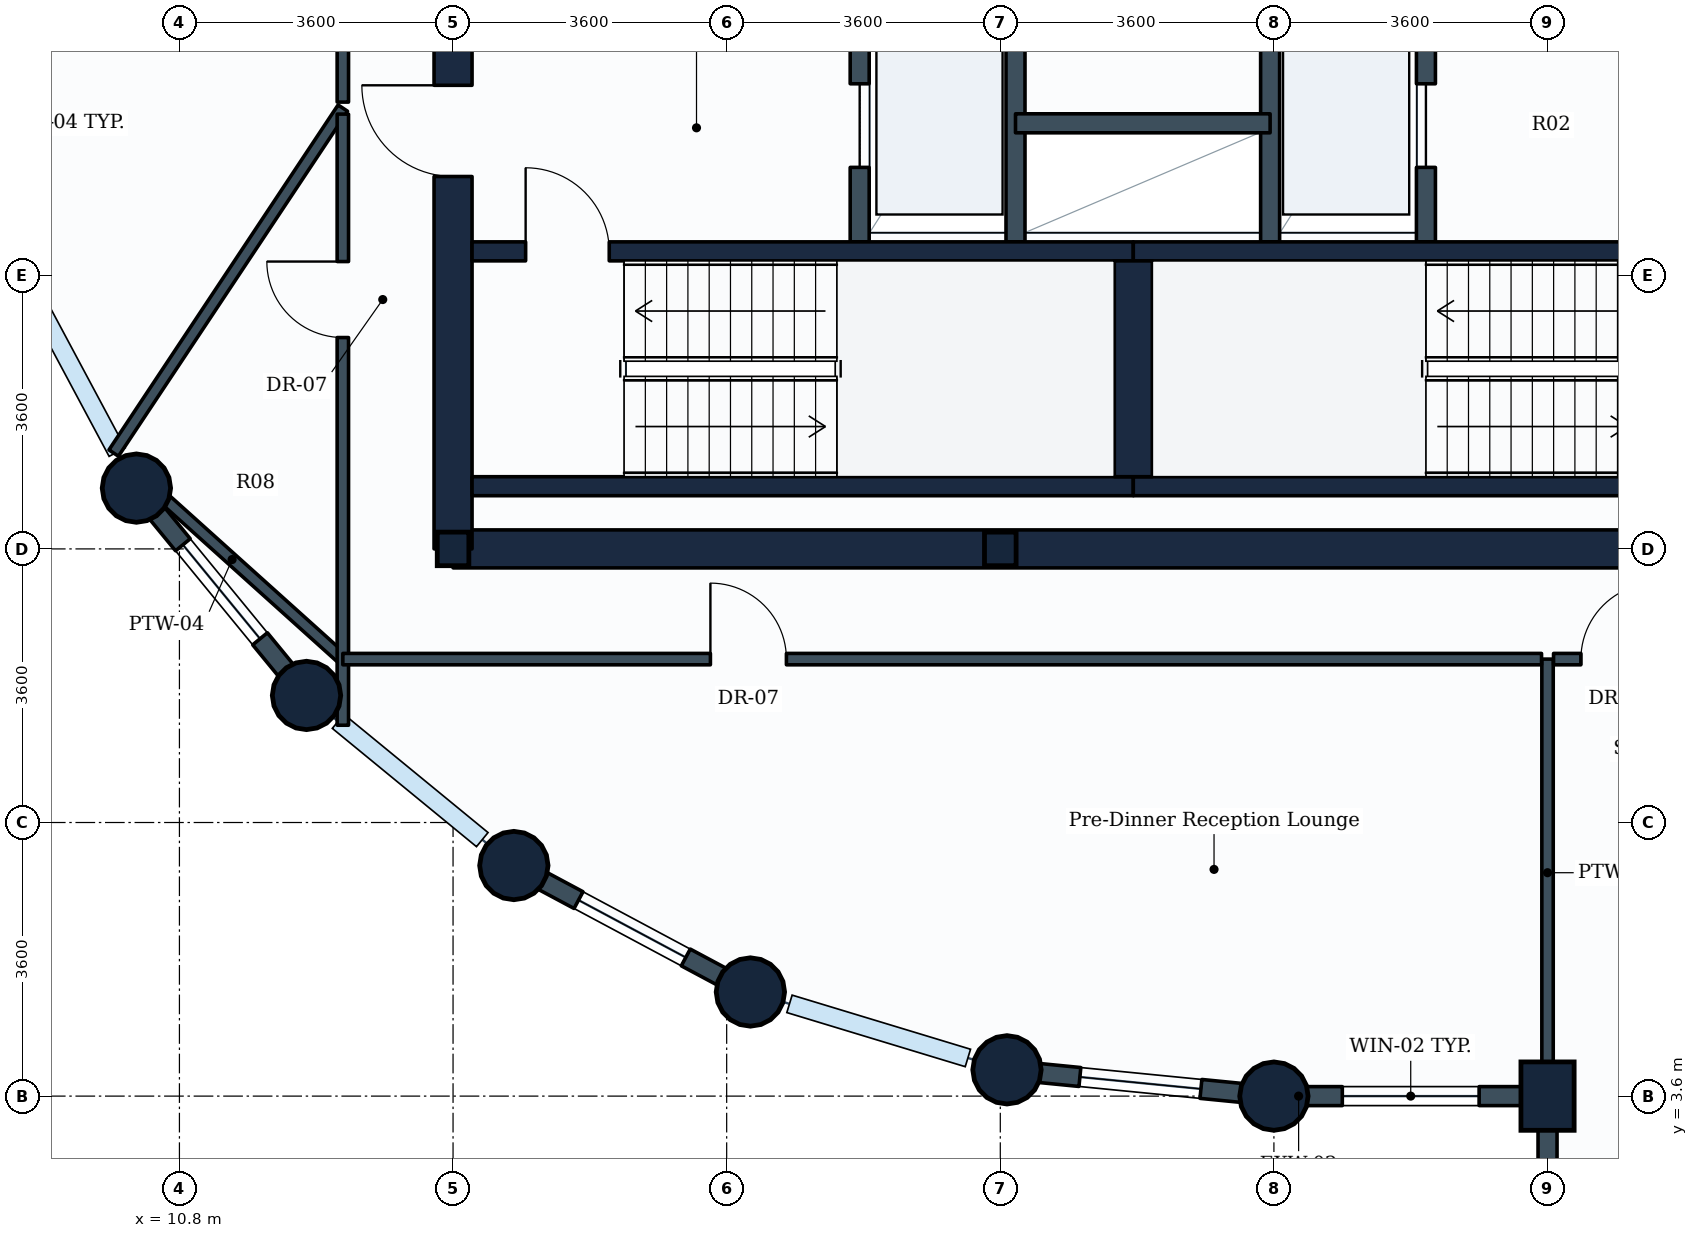
"""IFC4 building model, lengths in metres.
Left out: names, types, materials, properties, quantities, classifications, styles, units other than length and angle.
Written with IfcOpenShell. Run it as: python <this file> out.ifc"""

import sys

from ifc_helpers import new_model, si_unit, direction, frame, frame_2d, origin, origin_2d, place, context, subcontext, project, spatial, rectangle, circle, i_section, extrude, element, fill, save


model = new_model("IFC4")
c1 = context("Model", 3, precision=1e-05, world=origin(), true_north=direction((0.0, 1.0)))
c2 = subcontext(c1, "Body", "Model", "MODEL_VIEW")
j1 = project(units=[si_unit("LENGTHUNIT", "METRE"), si_unit("PLANEANGLEUNIT", "RADIAN")], contexts=[c1])
p1 = place(None, origin())
s1 = spatial("IfcSite", under=j1, at=p1, CompositionType="ELEMENT")
p2 = place(p1, origin())
s2 = spatial("IfcBuilding", under=s1, at=p2, CompositionType="ELEMENT")
p3 = place(p2, frame((0.0, 0.0, 205.2)))
s3 = spatial("IfcBuildingStorey", under=s2, at=p3, CompositionType="ELEMENT", Elevation=205.2)
for number, where, z_axis, x_axis in (
    (1, (10.234, 11.6, 0.0), (0.0, 0.0, 1.0), (1.0, 0.0, 0.0)),
    (2, (12.472, 8.872, 0.0), (0.0, 0.0, 1.0), (1.0, 0.0, 0.0)),
):
    element("IfcColumn", number, at=place(p3, frame(where, z_axis=z_axis, x_axis=x_axis)), inside=s3, PredefinedType="COLUMN", context=c2, shape_type="SweptSolid", body=[
        extrude(circle(Radius=0.45, at=origin_2d()), origin(), (0.0, 0.0, 1.0), 3.8),
    ])
p4 = place(p3, frame((14.4, 10.8, 0.0), z_axis=(0.0, 0.0, 1.0), x_axis=(1.0, 0.0, 0.0)))
e3 = element("IfcColumn", 3, at=p4, inside=s3, PredefinedType="COLUMN", context=c2, shape_type="SweptSolid", body=[
    extrude(i_section(OverallWidth=0.416, OverallDepth=0.442, WebThickness=0.025, FlangeThickness=0.041, FilletRadius=0.015, at=origin_2d()), origin(), (0.0, 0.0, 1.0), 3.8),
])
for number, where, z_axis, x_axis in (
    (4, (15.2, 6.634, 0.0), (0.0, 0.0, 1.0), (1.0, 0.0, 0.0)),
    (5, (18.312, 4.97, 0.0), (0.0, 0.0, 1.0), (1.0, 0.0, 0.0)),
):
    element("IfcColumn", number, at=place(p3, frame(where, z_axis=z_axis, x_axis=x_axis)), inside=s3, PredefinedType="COLUMN", context=c2, shape_type="SweptSolid", body=[
        extrude(circle(Radius=0.45, at=origin_2d()), origin(), (0.0, 0.0, 1.0), 3.8),
    ])
p5 = place(p3, frame((21.6, 10.8, 0.0), z_axis=(0.0, 0.0, 1.0), x_axis=(1.0, 0.0, 0.0)))
e6 = element("IfcColumn", 6, at=p5, inside=s3, PredefinedType="COLUMN", context=c2, shape_type="SweptSolid", body=[
    extrude(i_section(OverallWidth=0.416, OverallDepth=0.442, WebThickness=0.025, FlangeThickness=0.041, FilletRadius=0.015, at=origin_2d()), origin(), (0.0, 0.0, 1.0), 3.8),
])
for number, where, z_axis, x_axis in (
    (7, (21.688, 3.946, 0.0), (0.0, 0.0, 1.0), (1.0, 0.0, 0.0)),
    (8, (25.2, 3.6, 0.0), (0.0, 0.0, 1.0), (1.0, 0.0, 0.0)),
):
    element("IfcColumn", number, at=place(p3, frame(where, z_axis=z_axis, x_axis=x_axis)), inside=s3, PredefinedType="COLUMN", context=c2, shape_type="SweptSolid", body=[
        extrude(circle(Radius=0.45, at=origin_2d()), origin(), (0.0, 0.0, 1.0), 3.8),
    ])
p6 = place(p3, frame((28.8, 3.6, 0.0), z_axis=(0.0, 0.0, 1.0), x_axis=(1.0, 0.0, 0.0)))
e9 = element("IfcColumn", 9, at=p6, inside=s3, PredefinedType="COLUMN", context=c2, shape_type="SweptSolid", body=[
    extrude(rectangle(XDim=0.7, YDim=0.9, at=origin_2d()), origin(), (0.0, 0.0, 1.0), 3.8),
])
p7 = place(p3, frame((28.8, 3.6, 0.0), z_axis=(0.0, 0.0, 1.0), x_axis=(-1.0, 0.0, 0.0)))
e10 = element("IfcWall", 10, at=p7, inside=s3, PredefinedType="STANDARD", context=c2, shape_type="SweptSolid", body=[
    extrude(rectangle(XDim=3.6, YDim=0.25, at=frame_2d((1.8, 0.0))), origin(), (0.0, 0.0, 1.0), 2.93),
])
p8 = place(p7, frame((0.9, 0.0, 0.85)))
e11 = element("IfcOpeningElement", 11, at=p8, cuts=e10, PredefinedType="OPENING", context=c2, shape_type="SweptSolid", body=[
    extrude(rectangle(XDim=1.8, YDim=1.35, at=frame_2d((0.9, 0.675))), frame((0.0, 0.135, 0.0), z_axis=(0.0, -1.0, 0.0), x_axis=(1.0, 0.0, 0.0)), (0.0, 0.0, 1.0), 0.27),
])
p9 = place(p3, frame((28.8, 3.6, 0.0), z_axis=(0.0, 0.0, 1.0), x_axis=(0.0, -1.0, 0.0)))
e12 = element("IfcWall", 12, at=p9, inside=s3, PredefinedType="STANDARD", context=c2, shape_type="SweptSolid", body=[
    extrude(rectangle(XDim=2.1, YDim=0.25, at=frame_2d((1.05, 0.0))), origin(), (0.0, 0.0, 1.0), 2.93),
])
p10 = place(p3, frame((12.472, 8.872, 0.0), z_axis=(0.0, 0.0, 1.0), x_axis=(-0.634258295121, 0.773121216285, 0.0)))
e13 = element("IfcWall", 13, at=p10, inside=s3, PredefinedType="STANDARD", context=c2, shape_type="SweptSolid", body=[
    extrude(rectangle(XDim=3.529, YDim=0.25, at=frame_2d((1.764, 0.0))), origin(), (0.0, 0.0, 1.0), 2.93),
])
p11 = place(p10, frame((0.964, 0.0, 0.85)))
e14 = element("IfcOpeningElement", 14, at=p11, cuts=e13, PredefinedType="OPENING", context=c2, shape_type="SweptSolid", body=[
    extrude(rectangle(XDim=1.6, YDim=1.35, at=frame_2d((0.8, 0.675))), frame((0.0, 0.135, 0.0), z_axis=(0.0, -1.0, 0.0), x_axis=(1.0, 0.0, 0.0)), (0.0, 0.0, 1.0), 0.27),
])
p12 = place(p3, frame((18.312, 4.97, 0.0), z_axis=(0.0, 0.0, 1.0), x_axis=(-0.881846862014, 0.471535907389, 0.0)))
e15 = element("IfcWall", 15, at=p12, inside=s3, PredefinedType="STANDARD", context=c2, shape_type="SweptSolid", body=[
    extrude(rectangle(XDim=3.529, YDim=0.25, at=frame_2d((1.765, 0.0))), origin(), (0.0, 0.0, 1.0), 2.93),
])
p13 = place(p12, frame((0.964, 0.0, 0.85)))
e16 = element("IfcOpeningElement", 16, at=p13, cuts=e15, PredefinedType="OPENING", context=c2, shape_type="SweptSolid", body=[
    extrude(rectangle(XDim=1.6, YDim=1.35, at=frame_2d((0.8, 0.675))), frame((0.0, 0.135, 0.0), z_axis=(0.0, -1.0, 0.0), x_axis=(1.0, 0.0, 0.0)), (0.0, 0.0, 1.0), 0.27),
])
p14 = place(p3, frame((25.2, 3.6, 0.0), z_axis=(0.0, 0.0, 1.0), x_axis=(-0.995183369056, 0.098030923459, 0.0)))
e17 = element("IfcWall", 17, at=p14, inside=s3, PredefinedType="STANDARD", context=c2, shape_type="SweptSolid", body=[
    extrude(rectangle(XDim=3.529, YDim=0.25, at=frame_2d((1.765, 0.0))), origin(), (0.0, 0.0, 1.0), 2.93),
])
p15 = place(p14, frame((0.965, 0.0, 0.85)))
e18 = element("IfcOpeningElement", 18, at=p15, cuts=e17, PredefinedType="OPENING", context=c2, shape_type="SweptSolid", body=[
    extrude(rectangle(XDim=1.6, YDim=1.35, at=frame_2d((0.8, 0.675))), frame((0.0, 0.135, 0.0), z_axis=(0.0, -1.0, 0.0), x_axis=(1.0, 0.0, 0.0)), (0.0, 0.0, 1.0), 0.27),
])
p16 = place(p3, frame((14.4, 10.8, 0.0), z_axis=(0.0, 0.0, 1.0), x_axis=(1.0, 0.0, 0.0)))
e19 = element("IfcWall", 19, at=p16, inside=s3, PredefinedType="SHEAR", context=c2, shape_type="SweptSolid", body=[
    extrude(rectangle(XDim=18.0, YDim=0.5, at=frame_2d((9.0, 0.0))), origin(), (0.0, 0.0, 1.0), 3.48),
])
p17 = place(p3, frame((14.4, 10.8, 0.0), z_axis=(0.0, 0.0, 1.0), x_axis=(0.0, 1.0, 0.0)))
e20 = element("IfcWall", 20, at=p17, inside=s3, PredefinedType="SHEAR", context=c2, shape_type="SweptSolid", body=[
    extrude(rectangle(XDim=14.4, YDim=0.5, at=frame_2d((7.2, 0.0))), origin(), (0.0, 0.0, 1.0), 3.48),
])
p18 = place(p17, frame((11.05, 0.0, 0.0)))
e21 = element("IfcOpeningElement", 21, at=p18, cuts=e20, PredefinedType="OPENING", context=c2, shape_type="SweptSolid", body=[
    extrude(rectangle(XDim=1.1, YDim=2.1, at=frame_2d((0.55, 1.05))), frame((0.0, 0.26, 0.0), z_axis=(0.0, -1.0, 0.0), x_axis=(1.0, 0.0, 0.0)), (0.0, 0.0, 1.0), 0.52),
])
p19 = place(p17, frame((4.9, 0.0, 0.0)))
e22 = element("IfcOpeningElement", 22, at=p19, cuts=e20, PredefinedType="OPENING", context=c2, shape_type="SweptSolid", body=[
    extrude(rectangle(XDim=1.2, YDim=2.1, at=frame_2d((0.6, 1.05))), frame((0.0, 0.26, 0.0), z_axis=(0.0, -1.0, 0.0), x_axis=(1.0, 0.0, 0.0)), (0.0, 0.0, 1.0), 0.52),
])
p20 = place(p3, frame((14.65, 11.625, 0.0), z_axis=(0.0, 0.0, 1.0), x_axis=(1.0, 0.0, 0.0)))
e23 = element("IfcWall", 23, at=p20, inside=s3, PredefinedType="SHEAR", context=c2, shape_type="SweptSolid", body=[
    extrude(rectangle(XDim=8.7, YDim=0.25, at=frame_2d((4.35, 0.0))), origin(), (0.0, 0.0, 1.0), 3.48),
])
p21 = place(p3, frame((14.65, 14.715, 0.0), z_axis=(0.0, 0.0, 1.0), x_axis=(1.0, 0.0, 0.0)))
e24 = element("IfcWall", 24, at=p21, inside=s3, PredefinedType="SHEAR", context=c2, shape_type="SweptSolid", body=[
    extrude(rectangle(XDim=8.7, YDim=0.25, at=frame_2d((4.35, 0.0))), origin(), (0.0, 0.0, 1.0), 3.48),
])
p22 = place(p21, frame((0.705, 0.0, 0.0)))
e25 = element("IfcOpeningElement", 25, at=p22, cuts=e24, PredefinedType="OPENING", context=c2, shape_type="SweptSolid", body=[
    extrude(rectangle(XDim=1.1, YDim=2.1, at=frame_2d((0.55, 1.05))), frame((0.0, 0.135, 0.0), z_axis=(0.0, -1.0, 0.0), x_axis=(1.0, 0.0, 0.0)), (0.0, 0.0, 1.0), 0.27),
])
p23 = place(p3, frame((23.35, 11.625, 0.0), z_axis=(0.0, 0.0, 1.0), x_axis=(1.0, 0.0, 0.0)))
e26 = element("IfcWall", 26, at=p23, inside=s3, PredefinedType="SHEAR", context=c2, shape_type="SweptSolid", body=[
    extrude(rectangle(XDim=8.8, YDim=0.25, at=frame_2d((4.4, 0.0))), origin(), (0.0, 0.0, 1.0), 3.48),
])
p24 = place(p3, frame((23.35, 14.715, 0.0), z_axis=(0.0, 0.0, 1.0), x_axis=(1.0, 0.0, 0.0)))
e27 = element("IfcWall", 27, at=p24, inside=s3, PredefinedType="SHEAR", context=c2, shape_type="SweptSolid", body=[
    extrude(rectangle(XDim=8.8, YDim=0.25, at=frame_2d((4.4, 0.0))), origin(), (0.0, 0.0, 1.0), 3.48),
])
p25 = place(p24, frame((6.775, 0.0, 0.0)))
e28 = element("IfcOpeningElement", 28, at=p25, cuts=e27, PredefinedType="OPENING", context=c2, shape_type="SweptSolid", body=[
    extrude(rectangle(XDim=1.1, YDim=2.1, at=frame_2d((0.55, 1.05))), frame((0.0, 0.135, 0.0), z_axis=(0.0, -1.0, 0.0), x_axis=(1.0, 0.0, 0.0)), (0.0, 0.0, 1.0), 0.27),
])
p26 = place(p3, frame((23.35, 11.75, 0.0), z_axis=(0.0, 0.0, 1.0), x_axis=(0.0, 1.0, 0.0)))
e29 = element("IfcWall", 29, at=p26, inside=s3, PredefinedType="SHEAR", context=c2, shape_type="SweptSolid", body=[
    extrude(rectangle(XDim=2.84, YDim=0.5, at=frame_2d((1.42, 0.0))), origin(), (0.0, 0.0, 1.0), 3.48),
])
p27 = place(p3, frame((19.75, 14.84, 0.0), z_axis=(0.0, 0.0, 1.0), x_axis=(0.0, 1.0, 0.0)))
e30 = element("IfcWall", 30, at=p27, inside=s3, PredefinedType="PARTITIONING", context=c2, shape_type="SweptSolid", body=[
    extrude(rectangle(XDim=3.06, YDim=0.25, at=frame_2d((1.53, 0.0))), origin(), (0.0, 0.0, 1.0), 3.465),
])
p28 = place(p27, frame((0.98, 0.0, 0.0)))
e31 = element("IfcOpeningElement", 31, at=p28, cuts=e30, PredefinedType="OPENING", context=c2, shape_type="SweptSolid", body=[
    extrude(rectangle(XDim=1.1, YDim=2.1, at=frame_2d((0.55, 1.05))), frame((0.0, 0.135, 0.0), z_axis=(0.0, -1.0, 0.0), x_axis=(1.0, 0.0, 0.0)), (0.0, 0.0, 1.0), 0.27),
])
for number, where, z_axis, x_axis in (
    (32, (21.8, 14.84, 0.0), (0.0, 0.0, 1.0), (0.0, 1.0, 0.0)),
    (33, (25.15, 14.84, 0.0), (0.0, 0.0, 1.0), (0.0, 1.0, 0.0)),
):
    element("IfcWall", number, at=place(p3, frame(where, z_axis=z_axis, x_axis=x_axis)), inside=s3, PredefinedType="PARTITIONING", context=c2, shape_type="SweptSolid", body=[
        extrude(rectangle(XDim=3.06, YDim=0.25, at=frame_2d((1.53, 0.0))), origin(), (0.0, 0.0, 1.0), 3.465),
    ])
p29 = place(p3, frame((27.2, 14.84, 0.0), z_axis=(0.0, 0.0, 1.0), x_axis=(0.0, 1.0, 0.0)))
e34 = element("IfcWall", 34, at=p29, inside=s3, PredefinedType="PARTITIONING", context=c2, shape_type="SweptSolid", body=[
    extrude(rectangle(XDim=3.06, YDim=0.25, at=frame_2d((1.53, 0.0))), origin(), (0.0, 0.0, 1.0), 3.465),
])
p30 = place(p29, frame((0.98, 0.0, 0.0)))
e35 = element("IfcOpeningElement", 35, at=p30, cuts=e34, PredefinedType="OPENING", context=c2, shape_type="SweptSolid", body=[
    extrude(rectangle(XDim=1.1, YDim=2.1, at=frame_2d((0.55, 1.05))), frame((0.0, 0.135, 0.0), z_axis=(0.0, -1.0, 0.0), x_axis=(1.0, 0.0, 0.0)), (0.0, 0.0, 1.0), 0.27),
])
p31 = place(p3, frame((21.8, 16.4, 0.0), z_axis=(0.0, 0.0, 1.0), x_axis=(1.0, 0.0, 0.0)))
e36 = element("IfcWall", 36, at=p31, inside=s3, PredefinedType="PARTITIONING", context=c2, shape_type="SweptSolid", body=[
    extrude(rectangle(XDim=3.35, YDim=0.25, at=frame_2d((1.675, 0.0))), origin(), (0.0, 0.0, 1.0), 3.465),
])
p32 = place(p3, frame((28.8, 9.35, 0.0), z_axis=(0.0, 0.0, 1.0), x_axis=(0.0, -1.0, 0.0)))
e37 = element("IfcWall", 37, at=p32, inside=s3, PredefinedType="PARTITIONING", context=c2, shape_type="SweptSolid", body=[
    extrude(rectangle(XDim=5.621, YDim=0.15, at=frame_2d((2.811, 0.0))), origin(), (0.0, 0.0, 1.0), 3.465),
])
p33 = place(p3, frame((12.95, 9.35, 0.0), z_axis=(0.0, 0.0, 1.0), x_axis=(-0.743647207073, 0.668572233504, 0.0)))
e38 = element("IfcWall", 38, at=p33, inside=s3, PredefinedType="PARTITIONING", context=c2, shape_type="SweptSolid", body=[
    extrude(rectangle(XDim=3.919, YDim=0.15, at=frame_2d((1.959, 0.0))), origin(), (0.0, 0.0, 1.0), 2.93),
])
p34 = place(p3, frame((12.95, 16.6, 0.0), z_axis=(0.0, 0.0, 1.0), x_axis=(-0.553282901055, -0.832993416181, 0.0)))
e39 = element("IfcWall", 39, at=p34, inside=s3, PredefinedType="PARTITIONING", context=c2, shape_type="SweptSolid", body=[
    extrude(rectangle(XDim=5.449, YDim=0.15, at=frame_2d((2.725, 0.0))), origin(), (0.0, 0.0, 1.0), 2.93),
])
p35 = place(p3, frame((12.95, 16.679, 0.0), z_axis=(0.0, 0.0, 1.0), x_axis=(0.0, 1.0, 0.0)))
e40 = element("IfcWall", 40, at=p35, inside=s3, PredefinedType="PARTITIONING", context=c2, shape_type="SweptSolid", body=[
    extrude(rectangle(XDim=8.442, YDim=0.15, at=frame_2d((4.221, 0.0))), origin(), (0.0, 0.0, 1.0), 3.19),
])
p36 = place(p35, frame((3.721, 0.0, 0.0)))
e41 = element("IfcOpeningElement", 41, at=p36, cuts=e40, PredefinedType="OPENING", context=c2, shape_type="SweptSolid", body=[
    extrude(rectangle(XDim=1.0, YDim=2.1, at=frame_2d((0.5, 1.05))), frame((0.0, 0.085, 0.0), z_axis=(0.0, -1.0, 0.0), x_axis=(1.0, 0.0, 0.0)), (0.0, 0.0, 1.0), 0.17),
])
p37 = place(p3, frame((12.95, 8.48, 0.0), z_axis=(0.0, 0.0, 1.0), x_axis=(0.0, 1.0, 0.0)))
e42 = element("IfcWall", 42, at=p37, inside=s3, PredefinedType="PARTITIONING", context=c2, shape_type="SweptSolid", body=[
    extrude(rectangle(XDim=8.041, YDim=0.15, at=frame_2d((4.021, 0.0))), origin(), (0.0, 0.0, 1.0), 2.93),
])
p38 = place(p37, frame((5.101, 0.0, 0.0)))
e43 = element("IfcOpeningElement", 43, at=p38, cuts=e42, PredefinedType="OPENING", context=c2, shape_type="SweptSolid", body=[
    extrude(rectangle(XDim=1.0, YDim=2.1, at=frame_2d((0.5, 1.05))), frame((0.0, 0.085, 0.0), z_axis=(0.0, -1.0, 0.0), x_axis=(1.0, 0.0, 0.0)), (0.0, 0.0, 1.0), 0.17),
])
p39 = place(p3, frame((12.95, 9.35, 0.0), z_axis=(0.0, 0.0, 1.0), x_axis=(1.0, 0.0, 0.0)))
e44 = element("IfcWall", 44, at=p39, inside=s3, PredefinedType="PARTITIONING", context=c2, shape_type="SweptSolid", body=[
    extrude(rectangle(XDim=15.771, YDim=0.15, at=frame_2d((7.885, 0.0))), origin(), (0.0, 0.0, 1.0), 3.15),
])
p40 = place(p39, frame((4.836, 0.0, 0.0)))
e45 = element("IfcOpeningElement", 45, at=p40, cuts=e44, PredefinedType="OPENING", context=c2, shape_type="SweptSolid", body=[
    extrude(rectangle(XDim=1.0, YDim=2.1, at=frame_2d((0.5, 1.05))), frame((0.0, 0.085, 0.0), z_axis=(0.0, -1.0, 0.0), x_axis=(1.0, 0.0, 0.0)), (0.0, 0.0, 1.0), 0.17),
])
p41 = place(p3, frame((28.879, 9.35, 0.0), z_axis=(0.0, 0.0, 1.0), x_axis=(1.0, 0.0, 0.0)))
e46 = element("IfcWall", 46, at=p41, inside=s3, PredefinedType="PARTITIONING", context=c2, shape_type="SweptSolid", body=[
    extrude(rectangle(XDim=5.521, YDim=0.15, at=frame_2d((2.76, 0.0))), origin(), (0.0, 0.0, 1.0), 3.465),
])
p42 = place(p41, frame((0.36, 0.0, 0.0)))
e47 = element("IfcOpeningElement", 47, at=p42, cuts=e46, PredefinedType="OPENING", context=c2, shape_type="SweptSolid", body=[
    extrude(rectangle(XDim=1.0, YDim=2.1, at=frame_2d((0.5, 1.05))), frame((0.0, 0.085, 0.0), z_axis=(0.0, -1.0, 0.0), x_axis=(1.0, 0.0, 0.0)), (0.0, 0.0, 1.0), 0.17),
])
p43 = place(p8, origin())
e48 = element("IfcWindow", 48, at=p43, inside=s3, PartitioningType="SINGLE_PANEL", PredefinedType="WINDOW", context=c2, shape_type="SweptSolid", body=[
    extrude(rectangle(XDim=1.8, YDim=1.35, at=frame_2d((0.9, 0.675))), frame((0.0, 0.03, 0.0), z_axis=(0.0, -1.0, 0.0), x_axis=(1.0, 0.0, 0.0)), (0.0, 0.0, 1.0), 0.06),
])
fill(e11, e48)
p44 = place(p11, origin())
e49 = element("IfcWindow", 49, at=p44, inside=s3, PartitioningType="SINGLE_PANEL", PredefinedType="WINDOW", context=c2, shape_type="SweptSolid", body=[
    extrude(rectangle(XDim=1.6, YDim=1.35, at=frame_2d((0.8, 0.675))), frame((0.0, 0.03, 0.0), z_axis=(0.0, -1.0, 0.0), x_axis=(1.0, 0.0, 0.0)), (0.0, 0.0, 1.0), 0.06),
])
fill(e14, e49)
p45 = place(p13, origin())
e50 = element("IfcWindow", 50, at=p45, inside=s3, PartitioningType="SINGLE_PANEL", PredefinedType="WINDOW", context=c2, shape_type="SweptSolid", body=[
    extrude(rectangle(XDim=1.6, YDim=1.35, at=frame_2d((0.8, 0.675))), frame((0.0, 0.03, 0.0), z_axis=(0.0, -1.0, 0.0), x_axis=(1.0, 0.0, 0.0)), (0.0, 0.0, 1.0), 0.06),
])
fill(e16, e50)
p46 = place(p15, origin())
e51 = element("IfcWindow", 51, at=p46, inside=s3, PartitioningType="SINGLE_PANEL", PredefinedType="WINDOW", context=c2, shape_type="SweptSolid", body=[
    extrude(rectangle(XDim=1.6, YDim=1.35, at=frame_2d((0.8, 0.675))), frame((0.0, 0.03, 0.0), z_axis=(0.0, -1.0, 0.0), x_axis=(1.0, 0.0, 0.0)), (0.0, 0.0, 1.0), 0.06),
])
fill(e18, e51)
p47 = place(p22, origin())
e52 = element("IfcDoor", 52, at=p47, inside=s3, OperationType="SINGLE_SWING_LEFT", PredefinedType="DOOR", context=c2, shape_type="SweptSolid", body=[
    extrude(rectangle(XDim=1.1, YDim=2.1, at=frame_2d((0.55, 1.05))), frame((0.0, 0.025, 0.0), z_axis=(0.0, -1.0, 0.0), x_axis=(1.0, 0.0, 0.0)), (0.0, 0.0, 1.0), 0.05),
])
fill(e25, e52)
p48 = place(p28, origin())
e53 = element("IfcDoor", 53, at=p48, inside=s3, OperationType="SLIDING_TO_LEFT", PredefinedType="DOOR", context=c2, shape_type="SweptSolid", body=[
    extrude(rectangle(XDim=1.1, YDim=2.1, at=frame_2d((0.55, 1.05))), frame((0.0, 0.025, 0.0), z_axis=(0.0, -1.0, 0.0), x_axis=(1.0, 0.0, 0.0)), (0.0, 0.0, 1.0), 0.05),
])
fill(e31, e53)
p49 = place(p30, origin())
e54 = element("IfcDoor", 54, at=p49, inside=s3, OperationType="SLIDING_TO_LEFT", PredefinedType="DOOR", context=c2, shape_type="SweptSolid", body=[
    extrude(rectangle(XDim=1.1, YDim=2.1, at=frame_2d((0.55, 1.05))), frame((0.0, 0.025, 0.0), z_axis=(0.0, -1.0, 0.0), x_axis=(1.0, 0.0, 0.0)), (0.0, 0.0, 1.0), 0.05),
])
fill(e35, e54)
p50 = place(p19, origin())
e55 = element("IfcDoor", 55, at=p50, inside=s3, OperationType="SINGLE_SWING_RIGHT", PredefinedType="DOOR", context=c2, shape_type="SweptSolid", body=[
    extrude(rectangle(XDim=1.2, YDim=2.1, at=frame_2d((0.6, 1.05))), frame((0.0, 0.025, 0.0), z_axis=(0.0, -1.0, 0.0), x_axis=(1.0, 0.0, 0.0)), (0.0, 0.0, 1.0), 0.05),
])
fill(e22, e55)
p51 = place(p38, origin())
e56 = element("IfcDoor", 56, at=p51, inside=s3, OperationType="SINGLE_SWING_RIGHT", PredefinedType="DOOR", context=c2, shape_type="SweptSolid", body=[
    extrude(rectangle(XDim=1.0, YDim=2.1, at=frame_2d((0.5, 1.05))), frame((0.0, 0.025, 0.0), z_axis=(0.0, -1.0, 0.0), x_axis=(1.0, 0.0, 0.0)), (0.0, 0.0, 1.0), 0.05),
])
fill(e43, e56)
p52 = place(p40, origin())
e57 = element("IfcDoor", 57, at=p52, inside=s3, OperationType="SINGLE_SWING_LEFT", PredefinedType="DOOR", context=c2, shape_type="SweptSolid", body=[
    extrude(rectangle(XDim=1.0, YDim=2.1, at=frame_2d((0.5, 1.05))), frame((0.0, 0.025, 0.0), z_axis=(0.0, -1.0, 0.0), x_axis=(1.0, 0.0, 0.0)), (0.0, 0.0, 1.0), 0.05),
])
fill(e45, e57)
p53 = place(p42, origin())
e58 = element("IfcDoor", 58, at=p53, inside=s3, OperationType="SINGLE_SWING_RIGHT", PredefinedType="DOOR", context=c2, shape_type="SweptSolid", body=[
    extrude(rectangle(XDim=1.0, YDim=2.1, at=frame_2d((0.5, 1.05))), frame((0.0, 0.025, 0.0), z_axis=(0.0, -1.0, 0.0), x_axis=(1.0, 0.0, 0.0)), (0.0, 0.0, 1.0), 0.05),
])
fill(e47, e58)
save(model, sys.argv[1])
